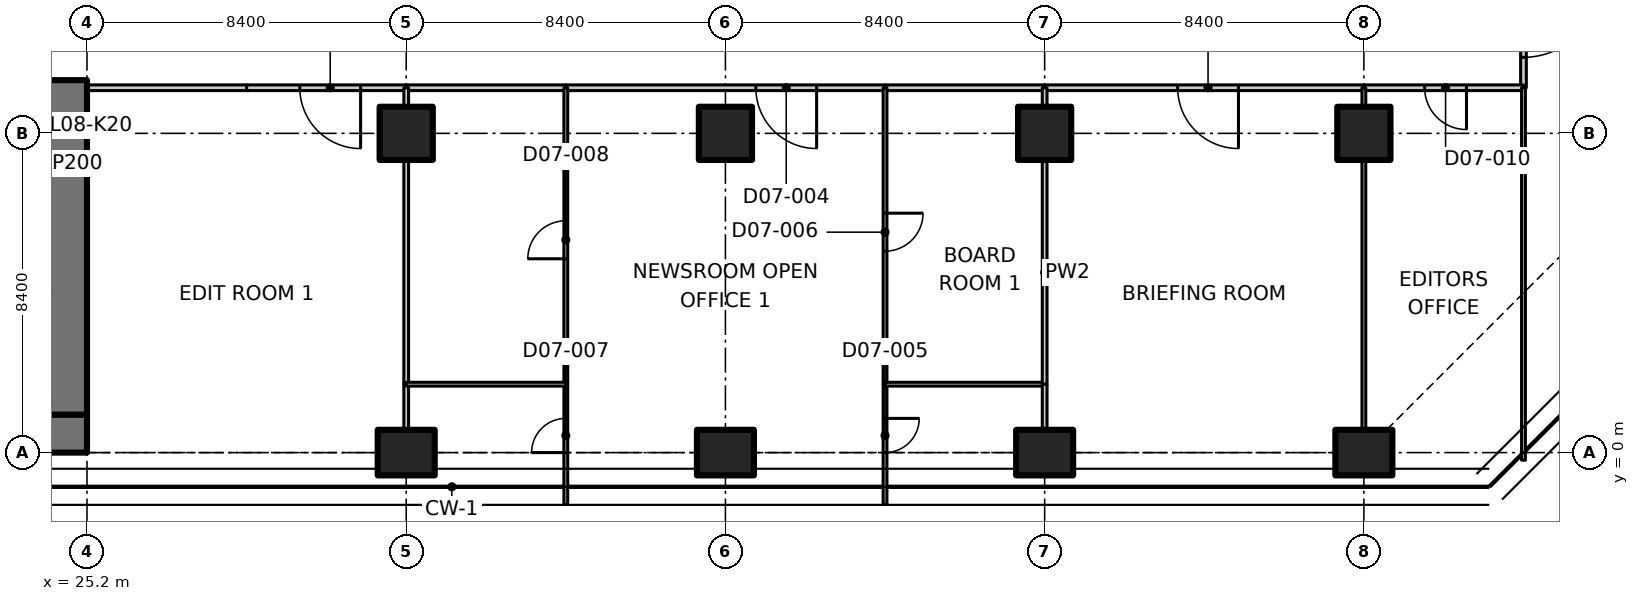
"""IFC4 building model, lengths in metres.
Left out: names, types, materials, properties, quantities, classifications, styles, units other than length and angle.
Written with IfcOpenShell. Run it as: python <this file> out.ifc"""

import sys

from ifc_helpers import new_model, si_unit, direction, frame, frame_2d, origin, origin_2d, place, context, subcontext, project, spatial, polyline, rectangle, outline, extrude, element, fill, save


model = new_model("IFC4")
c1 = context("Model", 3, precision=1e-05, world=origin(), true_north=direction((0.0, 1.0)))
c2 = subcontext(c1, "Body", "Model", "MODEL_VIEW")
j1 = project(units=[si_unit("LENGTHUNIT", "METRE"), si_unit("PLANEANGLEUNIT", "RADIAN")], contexts=[c1])
p1 = place(None, origin())
s1 = spatial("IfcSite", under=j1, at=p1, CompositionType="ELEMENT")
p2 = place(p1, origin())
s2 = spatial("IfcBuilding", under=s1, at=p2, CompositionType="ELEMENT")
p3 = place(p2, frame((0.0, 0.0, 43.7)))
s3 = spatial("IfcBuildingStorey", under=s2, at=p3, CompositionType="ELEMENT", Elevation=43.7)
p4 = place(p3, frame((33.6, 0.0, 0.0), z_axis=(0.0, 0.0, 1.0), x_axis=(0.0, 1.0, 0.0)))
e1 = element("IfcColumn", 1, at=p4, inside=s3, PredefinedType="COLUMN", context=c2, shape_type="SweptSolid", body=[
    extrude(rectangle(XDim=1.2, YDim=1.5, at=origin_2d()), origin(), (0.0, 0.0, 1.0), 3.35),
])
p5 = place(p3, frame((33.6, 8.4, 0.0), z_axis=(0.0, 0.0, 1.0), x_axis=(1.0, 0.0, 0.0)))
e2 = element("IfcColumn", 2, at=p5, inside=s3, PredefinedType="COLUMN", context=c2, shape_type="SweptSolid", body=[
    extrude(rectangle(XDim=1.4, YDim=1.4, at=origin_2d()), origin(), (0.0, 0.0, 1.0), 3.35),
])
p6 = place(p3, frame((42.0, 0.0, 0.0), z_axis=(0.0, 0.0, 1.0), x_axis=(0.0, 1.0, 0.0)))
e3 = element("IfcColumn", 3, at=p6, inside=s3, PredefinedType="COLUMN", context=c2, shape_type="SweptSolid", body=[
    extrude(rectangle(XDim=1.2, YDim=1.5, at=origin_2d()), origin(), (0.0, 0.0, 1.0), 3.35),
])
p7 = place(p3, frame((42.0, 8.4, 0.0), z_axis=(0.0, 0.0, 1.0), x_axis=(1.0, 0.0, 0.0)))
e4 = element("IfcColumn", 4, at=p7, inside=s3, PredefinedType="COLUMN", context=c2, shape_type="SweptSolid", body=[
    extrude(rectangle(XDim=1.4, YDim=1.4, at=origin_2d()), origin(), (0.0, 0.0, 1.0), 3.35),
])
p8 = place(p3, frame((50.4, 0.0, 0.0), z_axis=(0.0, 0.0, 1.0), x_axis=(0.0, 1.0, 0.0)))
e5 = element("IfcColumn", 5, at=p8, inside=s3, PredefinedType="COLUMN", context=c2, shape_type="SweptSolid", body=[
    extrude(rectangle(XDim=1.2, YDim=1.5, at=origin_2d()), origin(), (0.0, 0.0, 1.0), 3.35),
])
p9 = place(p3, frame((50.4, 8.4, 0.0), z_axis=(0.0, 0.0, 1.0), x_axis=(1.0, 0.0, 0.0)))
e6 = element("IfcColumn", 6, at=p9, inside=s3, PredefinedType="COLUMN", context=c2, shape_type="SweptSolid", body=[
    extrude(rectangle(XDim=1.4, YDim=1.4, at=origin_2d()), origin(), (0.0, 0.0, 1.0), 3.35),
])
p10 = place(p3, frame((58.8, 0.0, 0.0), z_axis=(0.0, 0.0, 1.0), x_axis=(0.0, 1.0, 0.0)))
e7 = element("IfcColumn", 7, at=p10, inside=s3, PredefinedType="COLUMN", context=c2, shape_type="SweptSolid", body=[
    extrude(rectangle(XDim=1.2, YDim=1.5, at=origin_2d()), origin(), (0.0, 0.0, 1.0), 3.35),
])
p11 = place(p3, frame((58.8, 8.4, 0.0), z_axis=(0.0, 0.0, 1.0), x_axis=(1.0, 0.0, 0.0)))
e8 = element("IfcColumn", 8, at=p11, inside=s3, PredefinedType="COLUMN", context=c2, shape_type="SweptSolid", body=[
    extrude(rectangle(XDim=1.4, YDim=1.4, at=origin_2d()), origin(), (0.0, 0.0, 1.0), 3.35),
])
p12 = place(p3, frame((6.936, 0.5, 0.0), z_axis=(0.0, 0.0, 1.0), x_axis=(1.0, 0.0, 0.0)))
e9 = element("IfcWall", 9, at=p12, inside=s3, PredefinedType="SHEAR", context=c2, shape_type="SweptSolid", body=[
    extrude(rectangle(XDim=18.264, YDim=1.0, at=frame_2d((9.132, 0.0))), origin(), (0.0, 0.0, 1.0), 3.35),
])
p13 = place(p3, frame((24.7, 1.0, 0.0), z_axis=(0.0, 0.0, 1.0), x_axis=(0.0, 1.0, 0.0)))
e10 = element("IfcWall", 10, at=p13, inside=s3, PredefinedType="SHEAR", context=c2, shape_type="SweptSolid", body=[
    extrude(rectangle(XDim=8.8, YDim=1.0, at=frame_2d((4.4, 0.0))), origin(), (0.0, 0.0, 1.0), 3.35),
])
p14 = place(p3, frame((29.4, 9.6, 0.0), z_axis=(0.0, 0.0, 1.0), x_axis=(-1.0, 0.0, 0.0)))
e11 = element("IfcWall", 11, at=p14, inside=s3, PredefinedType="PARTITIONING", context=c2, shape_type="SweptSolid", body=[
    extrude(rectangle(XDim=4.2, YDim=0.15, at=frame_2d((2.1, 0.0))), origin(), (0.0, 0.0, 1.0), 3.33),
])
p15 = place(p3, frame((63.0, 13.0, 0.0), z_axis=(0.0, 0.0, 1.0), x_axis=(0.0, -1.0, 0.0)))
e12 = element("IfcWall", 12, at=p15, inside=s3, PredefinedType="PARTITIONING", context=c2, shape_type="SweptSolid", body=[
    extrude(rectangle(XDim=3.4, YDim=0.15, at=frame_2d((1.7, 0.0))), origin(), (0.0, 0.0, 1.0), 3.33),
])
p16 = place(p15, frame((0.6, 0.0, 0.0)))
e13 = element("IfcOpeningElement", 13, at=p16, cuts=e12, PredefinedType="OPENING", context=c2, shape_type="SweptSolid", body=[
    extrude(rectangle(XDim=2.0, YDim=2.4, at=frame_2d((1.0, 1.2))), frame((0.0, 0.085, 0.0), z_axis=(0.0, -1.0, 0.0), x_axis=(1.0, 0.0, 0.0)), (0.0, 0.0, 1.0), 0.17),
])
p17 = place(p3, frame((33.6, 9.6, 0.0), z_axis=(0.0, 0.0, 1.0), x_axis=(-1.0, 0.0, 0.0)))
e14 = element("IfcWall", 14, at=p17, inside=s3, PredefinedType="PARTITIONING", context=c2, shape_type="SweptSolid", body=[
    extrude(rectangle(XDim=4.2, YDim=0.15, at=frame_2d((2.1, 0.0))), origin(), (0.0, 0.0, 1.0), 3.33),
])
p18 = place(p17, frame((1.2, 0.0, 0.0)))
e15 = element("IfcOpeningElement", 15, at=p18, cuts=e14, PredefinedType="OPENING", context=c2, shape_type="SweptSolid", body=[
    extrude(rectangle(XDim=1.6, YDim=2.1, at=frame_2d((0.8, 1.05))), frame((0.0, 0.085, 0.0), z_axis=(0.0, -1.0, 0.0), x_axis=(1.0, 0.0, 0.0)), (0.0, 0.0, 1.0), 0.17),
])
p19 = place(p3, frame((46.2, 9.6, 0.0), z_axis=(0.0, 0.0, 1.0), x_axis=(-1.0, 0.0, 0.0)))
e16 = element("IfcWall", 16, at=p19, inside=s3, PredefinedType="PARTITIONING", context=c2, shape_type="SweptSolid", body=[
    extrude(rectangle(XDim=8.4, YDim=0.15, at=frame_2d((4.2, 0.0))), origin(), (0.0, 0.0, 1.0), 3.33),
])
p20 = place(p19, frame((1.8, 0.0, 0.0)))
e17 = element("IfcOpeningElement", 17, at=p20, cuts=e16, PredefinedType="OPENING", context=c2, shape_type="SweptSolid", body=[
    extrude(rectangle(XDim=1.6, YDim=2.1, at=frame_2d((0.8, 1.05))), frame((0.0, 0.085, 0.0), z_axis=(0.0, -1.0, 0.0), x_axis=(1.0, 0.0, 0.0)), (0.0, 0.0, 1.0), 0.17),
])
for number, where, z_axis, x_axis in (
    (18, (50.4, 9.6, 0.0), (0.0, 0.0, 1.0), (-1.0, 0.0, 0.0)),
    (19, (37.8, 9.6, 0.0), (0.0, 0.0, 1.0), (-1.0, 0.0, 0.0)),
):
    element("IfcWall", number, at=place(p3, frame(where, z_axis=z_axis, x_axis=x_axis)), inside=s3, PredefinedType="PARTITIONING", context=c2, shape_type="SweptSolid", body=[
        extrude(rectangle(XDim=4.2, YDim=0.15, at=frame_2d((2.1, 0.0))), origin(), (0.0, 0.0, 1.0), 3.33),
    ])
p21 = place(p3, frame((58.8, 9.6, 0.0), z_axis=(0.0, 0.0, 1.0), x_axis=(-1.0, 0.0, 0.0)))
e20 = element("IfcWall", 20, at=p21, inside=s3, PredefinedType="PARTITIONING", context=c2, shape_type="SweptSolid", body=[
    extrude(rectangle(XDim=8.4, YDim=0.15, at=frame_2d((4.2, 0.0))), origin(), (0.0, 0.0, 1.0), 3.33),
])
p22 = place(p21, frame((3.3, 0.0, 0.0)))
e21 = element("IfcOpeningElement", 21, at=p22, cuts=e20, PredefinedType="OPENING", context=c2, shape_type="SweptSolid", body=[
    extrude(rectangle(XDim=1.6, YDim=2.1, at=frame_2d((0.8, 1.05))), frame((0.0, 0.085, 0.0), z_axis=(0.0, -1.0, 0.0), x_axis=(1.0, 0.0, 0.0)), (0.0, 0.0, 1.0), 0.17),
])
p23 = place(p3, frame((63.0, 9.6, 0.0), z_axis=(0.0, 0.0, 1.0), x_axis=(-1.0, 0.0, 0.0)))
e22 = element("IfcWall", 22, at=p23, inside=s3, PredefinedType="PARTITIONING", context=c2, shape_type="SweptSolid", body=[
    extrude(rectangle(XDim=4.2, YDim=0.15, at=frame_2d((2.1, 0.0))), origin(), (0.0, 0.0, 1.0), 3.33),
])
p24 = place(p23, frame((1.5, 0.0, 0.0)))
e23 = element("IfcOpeningElement", 23, at=p24, cuts=e22, PredefinedType="OPENING", context=c2, shape_type="SweptSolid", body=[
    extrude(rectangle(XDim=1.1, YDim=2.1, at=frame_2d((0.55, 1.05))), frame((0.0, 0.085, 0.0), z_axis=(0.0, -1.0, 0.0), x_axis=(1.0, 0.0, 0.0)), (0.0, 0.0, 1.0), 0.17),
])
p25 = place(p3, frame((63.0, -0.2, 0.0), z_axis=(0.0, 0.0, 1.0), x_axis=(0.0, 1.0, 0.0)))
e24 = element("IfcWall", 24, at=p25, inside=s3, PredefinedType="PARTITIONING", context=c2, shape_type="SweptSolid", body=[
    extrude(outline(polyline([(0.0, 0.0), (9.8, 0.0), (9.8, 3.33), (5.066, 3.33), (5.064, 2.98), (3.736, 2.98), (3.734, 3.33), (0.0, 3.33), (0.0, 0.0)])), frame((0.0, 0.05, 0.0), z_axis=(0.0, -1.0, 0.0), x_axis=(1.0, 0.0, 0.0)), (0.0, 0.0, 1.0), 0.1),
])
p26 = place(p3, frame((33.6, 1.8, 0.0), z_axis=(0.0, 0.0, 1.0), x_axis=(0.0, -1.0, 0.0)))
e25 = element("IfcWall", 25, at=p26, inside=s3, PredefinedType="PARTITIONING", context=c2, shape_type="SweptSolid", body=[
    extrude(rectangle(XDim=1.18, YDim=0.125, at=frame_2d((0.59, 0.0))), origin(), (0.0, 0.0, 1.0), 3.33),
])
p27 = place(p3, frame((33.6, 9.6, 0.0), z_axis=(0.0, 0.0, 1.0), x_axis=(0.0, -1.0, 0.0)))
e26 = element("IfcWall", 26, at=p27, inside=s3, PredefinedType="PARTITIONING", context=c2, shape_type="SweptSolid", body=[
    extrude(rectangle(XDim=0.48, YDim=0.125, at=frame_2d((0.24, 0.0))), origin(), (0.0, 0.0, 1.0), 3.33),
])
p28 = place(p3, frame((33.6, 7.68, 0.0), z_axis=(0.0, 0.0, 1.0), x_axis=(0.0, -1.0, 0.0)))
e27 = element("IfcWall", 27, at=p28, inside=s3, PredefinedType="PARTITIONING", context=c2, shape_type="SweptSolid", body=[
    extrude(rectangle(XDim=5.88, YDim=0.125, at=frame_2d((2.94, 0.0))), origin(), (0.0, 0.0, 1.0), 3.33),
])
p29 = place(p3, frame((46.2, 1.8, 0.0), z_axis=(0.0, 0.0, 1.0), x_axis=(0.0, -1.0, 0.0)))
e28 = element("IfcWall", 28, at=p29, inside=s3, PredefinedType="PARTITIONING", context=c2, shape_type="SweptSolid", body=[
    extrude(rectangle(XDim=3.165, YDim=0.1, at=frame_2d((1.583, 0.0))), origin(), (0.0, 0.0, 1.0), 2.98),
])
p30 = place(p29, frame((0.9, 0.0, 0.0)))
e29 = element("IfcOpeningElement", 29, at=p30, cuts=e28, PredefinedType="OPENING", context=c2, shape_type="SweptSolid", body=[
    extrude(rectangle(XDim=0.9, YDim=2.1, at=frame_2d((0.45, 1.05))), frame((0.0, 0.06, 0.0), z_axis=(0.0, -1.0, 0.0), x_axis=(1.0, 0.0, 0.0)), (0.0, 0.0, 1.0), 0.12),
])
p31 = place(p3, frame((46.2, 9.6, 0.0), z_axis=(0.0, 0.0, 1.0), x_axis=(0.0, -1.0, 0.0)))
e30 = element("IfcWall", 30, at=p31, inside=s3, PredefinedType="PARTITIONING", context=c2, shape_type="SweptSolid", body=[
    extrude(rectangle(XDim=7.8, YDim=0.1, at=frame_2d((3.9, 0.0))), origin(), (0.0, 0.0, 1.0), 3.33),
])
p32 = place(p31, frame((3.3, 0.0, 0.0)))
e31 = element("IfcOpeningElement", 31, at=p32, cuts=e30, PredefinedType="OPENING", context=c2, shape_type="SweptSolid", body=[
    extrude(rectangle(XDim=1.0, YDim=2.1, at=frame_2d((0.5, 1.05))), frame((0.0, 0.06, 0.0), z_axis=(0.0, -1.0, 0.0), x_axis=(1.0, 0.0, 0.0)), (0.0, 0.0, 1.0), 0.12),
])
p33 = place(p3, frame((37.8, -1.365, 0.0), z_axis=(0.0, 0.0, 1.0), x_axis=(0.0, 1.0, 0.0)))
e32 = element("IfcWall", 32, at=p33, inside=s3, PredefinedType="PARTITIONING", context=c2, shape_type="SweptSolid", body=[
    extrude(rectangle(XDim=3.165, YDim=0.1, at=frame_2d((1.583, 0.0))), origin(), (0.0, 0.0, 1.0), 2.98),
])
p34 = place(p33, frame((1.365, 0.0, 0.0)))
e33 = element("IfcOpeningElement", 33, at=p34, cuts=e32, PredefinedType="OPENING", context=c2, shape_type="SweptSolid", body=[
    extrude(rectangle(XDim=0.9, YDim=2.1, at=frame_2d((0.45, 1.05))), frame((0.0, 0.06, 0.0), z_axis=(0.0, -1.0, 0.0), x_axis=(1.0, 0.0, 0.0)), (0.0, 0.0, 1.0), 0.12),
])
p35 = place(p3, frame((37.8, 1.8, 0.0), z_axis=(0.0, 0.0, 1.0), x_axis=(0.0, 1.0, 0.0)))
e34 = element("IfcWall", 34, at=p35, inside=s3, PredefinedType="PARTITIONING", context=c2, shape_type="SweptSolid", body=[
    extrude(rectangle(XDim=7.8, YDim=0.1, at=frame_2d((3.9, 0.0))), origin(), (0.0, 0.0, 1.0), 3.33),
])
p36 = place(p35, frame((3.3, 0.0, 0.0)))
e35 = element("IfcOpeningElement", 35, at=p36, cuts=e34, PredefinedType="OPENING", context=c2, shape_type="SweptSolid", body=[
    extrude(rectangle(XDim=1.0, YDim=2.1, at=frame_2d((0.5, 1.05))), frame((0.0, 0.06, 0.0), z_axis=(0.0, -1.0, 0.0), x_axis=(1.0, 0.0, 0.0)), (0.0, 0.0, 1.0), 0.12),
])
p37 = place(p3, frame((46.2, 1.8, 0.0), z_axis=(0.0, 0.0, 1.0), x_axis=(1.0, 0.0, 0.0)))
e36 = element("IfcWall", 36, at=p37, inside=s3, PredefinedType="PARTITIONING", context=c2, shape_type="SweptSolid", body=[
    extrude(rectangle(XDim=4.2, YDim=0.1, at=frame_2d((2.1, 0.0))), origin(), (0.0, 0.0, 1.0), 3.33),
])
p38 = place(p3, frame((50.4, 1.8, 0.0), z_axis=(0.0, 0.0, 1.0), x_axis=(0.0, -1.0, 0.0)))
e37 = element("IfcWall", 37, at=p38, inside=s3, PredefinedType="PARTITIONING", context=c2, shape_type="SweptSolid", body=[
    extrude(rectangle(XDim=1.18, YDim=0.125, at=frame_2d((0.59, 0.0))), origin(), (0.0, 0.0, 1.0), 3.33),
])
p39 = place(p3, frame((50.4, 9.6, 0.0), z_axis=(0.0, 0.0, 1.0), x_axis=(0.0, -1.0, 0.0)))
e38 = element("IfcWall", 38, at=p39, inside=s3, PredefinedType="PARTITIONING", context=c2, shape_type="SweptSolid", body=[
    extrude(rectangle(XDim=0.48, YDim=0.125, at=frame_2d((0.24, 0.0))), origin(), (0.0, 0.0, 1.0), 3.33),
])
p40 = place(p3, frame((50.4, 7.68, 0.0), z_axis=(0.0, 0.0, 1.0), x_axis=(0.0, -1.0, 0.0)))
e39 = element("IfcWall", 39, at=p40, inside=s3, PredefinedType="PARTITIONING", context=c2, shape_type="SweptSolid", body=[
    extrude(rectangle(XDim=5.88, YDim=0.125, at=frame_2d((2.94, 0.0))), origin(), (0.0, 0.0, 1.0), 3.33),
])
p41 = place(p3, frame((33.6, 1.8, 0.0), z_axis=(0.0, 0.0, 1.0), x_axis=(1.0, 0.0, 0.0)))
e40 = element("IfcWall", 40, at=p41, inside=s3, PredefinedType="PARTITIONING", context=c2, shape_type="SweptSolid", body=[
    extrude(rectangle(XDim=4.2, YDim=0.1, at=frame_2d((2.1, 0.0))), origin(), (0.0, 0.0, 1.0), 3.33),
])
p42 = place(p3, frame((58.8, 9.6, 0.0), z_axis=(0.0, 0.0, 1.0), x_axis=(0.0, -1.0, 0.0)))
e41 = element("IfcWall", 41, at=p42, inside=s3, PredefinedType="PARTITIONING", context=c2, shape_type="SweptSolid", body=[
    extrude(rectangle(XDim=0.48, YDim=0.1, at=frame_2d((0.24, 0.0))), origin(), (0.0, 0.0, 1.0), 3.33),
])
p43 = place(p3, frame((58.8, 7.68, 0.0), z_axis=(0.0, 0.0, 1.0), x_axis=(0.0, -1.0, 0.0)))
e42 = element("IfcWall", 42, at=p43, inside=s3, PredefinedType="PARTITIONING", context=c2, shape_type="SweptSolid", body=[
    extrude(rectangle(XDim=7.06, YDim=0.1, at=frame_2d((3.53, 0.0))), origin(), (0.0, 0.0, 1.0), 3.33),
])
p44 = place(p16, origin())
e43 = element("IfcDoor", 43, at=p44, inside=s3, OperationType="DOUBLE_DOOR_SINGLE_SWING", PredefinedType="DOOR", context=c2, shape_type="SweptSolid", body=[
    extrude(rectangle(XDim=2.0, YDim=2.4, at=frame_2d((1.0, 1.2))), frame((0.0, 0.025, 0.0), z_axis=(0.0, -1.0, 0.0), x_axis=(1.0, 0.0, 0.0)), (0.0, 0.0, 1.0), 0.05),
])
fill(e13, e43)
p45 = place(p18, origin())
e44 = element("IfcDoor", 44, at=p45, inside=s3, OperationType="DOUBLE_DOOR_SINGLE_SWING", PredefinedType="DOOR", context=c2, shape_type="SweptSolid", body=[
    extrude(rectangle(XDim=1.6, YDim=2.1, at=frame_2d((0.8, 1.05))), frame((0.0, 0.025, 0.0), z_axis=(0.0, -1.0, 0.0), x_axis=(1.0, 0.0, 0.0)), (0.0, 0.0, 1.0), 0.05),
])
fill(e15, e44)
p46 = place(p20, origin())
e45 = element("IfcDoor", 45, at=p46, inside=s3, OperationType="DOUBLE_DOOR_SINGLE_SWING", PredefinedType="DOOR", context=c2, shape_type="SweptSolid", body=[
    extrude(rectangle(XDim=1.6, YDim=2.1, at=frame_2d((0.8, 1.05))), frame((0.0, 0.025, 0.0), z_axis=(0.0, -1.0, 0.0), x_axis=(1.0, 0.0, 0.0)), (0.0, 0.0, 1.0), 0.05),
])
fill(e17, e45)
p47 = place(p30, origin())
e46 = element("IfcDoor", 46, at=p47, inside=s3, OperationType="SINGLE_SWING_LEFT", PredefinedType="DOOR", context=c2, shape_type="SweptSolid", body=[
    extrude(rectangle(XDim=0.9, YDim=2.1, at=frame_2d((0.45, 1.05))), frame((0.0, 0.025, 0.0), z_axis=(0.0, -1.0, 0.0), x_axis=(1.0, 0.0, 0.0)), (0.0, 0.0, 1.0), 0.05),
])
fill(e29, e46)
p48 = place(p32, origin())
e47 = element("IfcDoor", 47, at=p48, inside=s3, OperationType="SINGLE_SWING_LEFT", PredefinedType="DOOR", context=c2, shape_type="SweptSolid", body=[
    extrude(rectangle(XDim=1.0, YDim=2.1, at=frame_2d((0.5, 1.05))), frame((0.0, 0.025, 0.0), z_axis=(0.0, -1.0, 0.0), x_axis=(1.0, 0.0, 0.0)), (0.0, 0.0, 1.0), 0.05),
])
fill(e31, e47)
p49 = place(p34, origin())
e48 = element("IfcDoor", 48, at=p49, inside=s3, OperationType="SINGLE_SWING_LEFT", PredefinedType="DOOR", context=c2, shape_type="SweptSolid", body=[
    extrude(rectangle(XDim=0.9, YDim=2.1, at=frame_2d((0.45, 1.05))), frame((0.0, 0.025, 0.0), z_axis=(0.0, -1.0, 0.0), x_axis=(1.0, 0.0, 0.0)), (0.0, 0.0, 1.0), 0.05),
])
fill(e33, e48)
p50 = place(p36, origin())
e49 = element("IfcDoor", 49, at=p50, inside=s3, OperationType="SINGLE_SWING_LEFT", PredefinedType="DOOR", context=c2, shape_type="SweptSolid", body=[
    extrude(rectangle(XDim=1.0, YDim=2.1, at=frame_2d((0.5, 1.05))), frame((0.0, 0.025, 0.0), z_axis=(0.0, -1.0, 0.0), x_axis=(1.0, 0.0, 0.0)), (0.0, 0.0, 1.0), 0.05),
])
fill(e35, e49)
p51 = place(p22, origin())
e50 = element("IfcDoor", 50, at=p51, inside=s3, OperationType="DOUBLE_DOOR_SINGLE_SWING", PredefinedType="DOOR", context=c2, shape_type="SweptSolid", body=[
    extrude(rectangle(XDim=1.6, YDim=2.1, at=frame_2d((0.8, 1.05))), frame((0.0, 0.025, 0.0), z_axis=(0.0, -1.0, 0.0), x_axis=(1.0, 0.0, 0.0)), (0.0, 0.0, 1.0), 0.05),
])
fill(e21, e50)
p52 = place(p24, origin())
e51 = element("IfcDoor", 51, at=p52, inside=s3, OperationType="SINGLE_SWING_LEFT", PredefinedType="DOOR", context=c2, shape_type="SweptSolid", body=[
    extrude(rectangle(XDim=1.1, YDim=2.1, at=frame_2d((0.55, 1.05))), frame((0.0, 0.025, 0.0), z_axis=(0.0, -1.0, 0.0), x_axis=(1.0, 0.0, 0.0)), (0.0, 0.0, 1.0), 0.05),
])
fill(e23, e51)
save(model, sys.argv[1])
